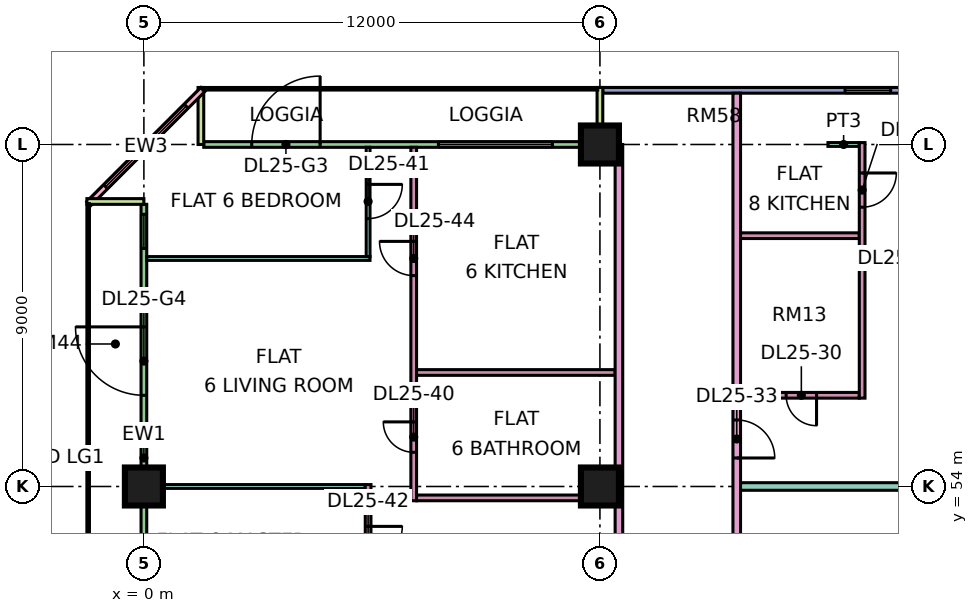
"""IFC4 building model, lengths in metres.
Left out: names, types, materials, properties, quantities, classifications, styles, units other than length and angle.
Written with IfcOpenShell. Run it as: python <this file> out.ifc"""

import sys

from ifc_helpers import new_model, si_unit, direction, frame, frame_2d, origin, origin_2d, place, context, subcontext, project, spatial, rectangle, extrude, element, fill, save


model = new_model("IFC4")
c1 = context("Model", 3, precision=1e-05, world=origin(), true_north=direction((0.0, 1.0)))
c2 = subcontext(c1, "Body", "Model", "MODEL_VIEW")
j1 = project(units=[si_unit("LENGTHUNIT", "METRE"), si_unit("PLANEANGLEUNIT", "RADIAN")], contexts=[c1])
p1 = place(None, origin())
s1 = spatial("IfcSite", under=j1, at=p1, CompositionType="ELEMENT")
p2 = place(p1, origin())
s2 = spatial("IfcBuilding", under=s1, at=p2, CompositionType="ELEMENT")
p3 = place(p2, frame((0.0, 0.0, 110.65)))
s3 = spatial("IfcBuildingStorey", under=s2, at=p3, CompositionType="ELEMENT", Elevation=110.65)
for number, where, z_axis, x_axis in (
    (1, (0.0, 54.0, 0.0), (0.0, 0.0, 1.0), (1.0, 0.0, 0.0)),
    (2, (12.0, 54.0, 0.0), (0.0, 0.0, 1.0), (1.0, 0.0, 0.0)),
    (3, (12.0, 63.0, 0.0), (0.0, 0.0, 1.0), (1.0, 0.0, 0.0)),
):
    element("IfcColumn", number, at=place(p3, frame(where, z_axis=z_axis, x_axis=x_axis)), inside=s3, PredefinedType="COLUMN", context=c2, shape_type="SweptSolid", body=[
        extrude(rectangle(XDim=1.0, YDim=1.0, at=origin_2d()), origin(), (0.0, 0.0, 1.0), 3.75),
    ])
p4 = place(p3, frame((22.5, 64.425, 0.0), z_axis=(0.0, 0.0, 1.0), x_axis=(-1.0, 0.0, 0.0)))
e4 = element("IfcWall", 4, at=p4, inside=s3, PredefinedType="SOLIDWALL", context=c2, shape_type="SweptSolid", body=[
    extrude(rectangle(XDim=10.425, YDim=0.15, at=frame_2d((5.212, 0.0))), origin(), (0.0, 0.0, 1.0), 3.35),
])
p5 = place(p4, frame((0.6, 0.0, 0.45)))
e5 = element("IfcOpeningElement", 5, at=p5, cuts=e4, PredefinedType="OPENING", context=c2, shape_type="SweptSolid", body=[
    extrude(rectangle(XDim=1.2, YDim=2.4, at=frame_2d((0.6, 1.2))), frame((0.0, 0.085, 0.0), z_axis=(0.0, -1.0, 0.0), x_axis=(1.0, 0.0, 0.0)), (0.0, 0.0, 1.0), 0.17),
])
p6 = place(p4, frame((2.85, 0.0, 0.45)))
e6 = element("IfcOpeningElement", 6, at=p6, cuts=e4, PredefinedType="OPENING", context=c2, shape_type="SweptSolid", body=[
    extrude(rectangle(XDim=1.2, YDim=2.4, at=frame_2d((0.6, 1.2))), frame((0.0, 0.085, 0.0), z_axis=(0.0, -1.0, 0.0), x_axis=(1.0, 0.0, 0.0)), (0.0, 0.0, 1.0), 0.17),
])
p7 = place(p3, frame((11.925, 63.0, 0.0), z_axis=(0.0, 0.0, 1.0), x_axis=(-1.0, 0.0, 0.0)))
e7 = element("IfcWall", 7, at=p7, inside=s3, PredefinedType="SOLIDWALL", context=c2, shape_type="SweptSolid", body=[
    extrude(rectangle(XDim=10.35, YDim=0.15, at=frame_2d((5.175, 0.0))), origin(), (0.0, 0.0, 1.0), 3.35),
])
p8 = place(p7, frame((1.175, 0.0, 0.45)))
e8 = element("IfcOpeningElement", 8, at=p8, cuts=e7, PredefinedType="OPENING", context=c2, shape_type="SweptSolid", body=[
    extrude(rectangle(XDim=3.0, YDim=2.4, at=frame_2d((1.5, 1.2))), frame((0.0, 0.085, 0.0), z_axis=(0.0, -1.0, 0.0), x_axis=(1.0, 0.0, 0.0)), (0.0, 0.0, 1.0), 0.17),
])
p9 = place(p7, frame((7.288, 0.0, 0.0)))
e9 = element("IfcOpeningElement", 9, at=p9, cuts=e7, PredefinedType="OPENING", context=c2, shape_type="SweptSolid", body=[
    extrude(rectangle(XDim=1.8, YDim=2.4, at=frame_2d((0.9, 1.2))), frame((0.0, 0.085, 0.0), z_axis=(0.0, -1.0, 0.0), x_axis=(1.0, 0.0, 0.0)), (0.0, 0.0, 1.0), 0.17),
])
for number, where, z_axis, x_axis in (
    (10, (12.0, 64.5, 0.0), (0.0, 0.0, 1.0), (0.0, -1.0, 0.0)),
    (11, (1.5, 64.5, 0.0), (0.0, 0.0, 1.0), (0.0, -1.0, 0.0)),
):
    element("IfcWall", number, at=place(p3, frame(where, z_axis=z_axis, x_axis=x_axis)), inside=s3, PredefinedType="SOLIDWALL", context=c2, shape_type="SweptSolid", body=[
        extrude(rectangle(XDim=1.5, YDim=0.15, at=frame_2d((0.75, 0.0))), origin(), (0.0, 0.0, 1.0), 3.35),
    ])
p10 = place(p3, frame((1.553, 64.447, 0.0), z_axis=(0.0, 0.0, 1.0), x_axis=(-0.707106781187, -0.707106781187, 0.0)))
e12 = element("IfcWall", 12, at=p10, inside=s3, PredefinedType="SOLIDWALL", context=c2, shape_type="SweptSolid", body=[
    extrude(rectangle(XDim=4.243, YDim=0.15, at=frame_2d((2.121, 0.0))), origin(), (0.0, 0.0, 1.0), 3.35),
])
p11 = place(p10, frame((0.621, 0.0, 0.45)))
e13 = element("IfcOpeningElement", 13, at=p11, cuts=e12, PredefinedType="OPENING", context=c2, shape_type="SweptSolid", body=[
    extrude(rectangle(XDim=3.0, YDim=2.4, at=frame_2d((1.5, 1.2))), frame((0.0, 0.085, 0.0), z_axis=(0.0, -1.0, 0.0), x_axis=(1.0, 0.0, 0.0)), (0.0, 0.0, 1.0), 0.17),
])
p12 = place(p3, frame((0.0, 61.425, 0.0), z_axis=(0.0, 0.0, 1.0), x_axis=(0.0, -1.0, 0.0)))
e14 = element("IfcWall", 14, at=p12, inside=s3, PredefinedType="SOLIDWALL", context=c2, shape_type="SweptSolid", body=[
    extrude(rectangle(XDim=13.35, YDim=0.15, at=frame_2d((6.675, 0.0))), origin(), (0.0, 0.0, 1.0), 3.35),
])
p13 = place(p12, frame((0.262, 0.0, 0.45)))
e15 = element("IfcOpeningElement", 15, at=p13, cuts=e14, PredefinedType="OPENING", context=c2, shape_type="SweptSolid", body=[
    extrude(rectangle(XDim=0.9, YDim=2.4, at=frame_2d((0.45, 1.2))), frame((0.0, 0.085, 0.0), z_axis=(0.0, -1.0, 0.0), x_axis=(1.0, 0.0, 0.0)), (0.0, 0.0, 1.0), 0.17),
])
p14 = place(p12, frame((3.225, 0.0, 0.0)))
e16 = element("IfcOpeningElement", 16, at=p14, cuts=e14, PredefinedType="OPENING", context=c2, shape_type="SweptSolid", body=[
    extrude(rectangle(XDim=1.8, YDim=2.4, at=frame_2d((0.9, 1.2))), frame((0.0, 0.085, 0.0), z_axis=(0.0, -1.0, 0.0), x_axis=(1.0, 0.0, 0.0)), (0.0, 0.0, 1.0), 0.17),
])
p15 = place(p12, frame((9.188, 0.0, 0.45)))
e17 = element("IfcOpeningElement", 17, at=p15, cuts=e14, PredefinedType="OPENING", context=c2, shape_type="SweptSolid", body=[
    extrude(rectangle(XDim=3.0, YDim=2.4, at=frame_2d((1.5, 1.2))), frame((0.0, 0.085, 0.0), z_axis=(0.0, -1.0, 0.0), x_axis=(1.0, 0.0, 0.0)), (0.0, 0.0, 1.0), 0.17),
])
p16 = place(p3, frame((-1.5, 61.5, 0.0), z_axis=(0.0, 0.0, 1.0), x_axis=(1.0, 0.0, 0.0)))
e18 = element("IfcWall", 18, at=p16, inside=s3, PredefinedType="SOLIDWALL", context=c2, shape_type="SweptSolid", body=[
    extrude(rectangle(XDim=1.5, YDim=0.15, at=frame_2d((0.75, 0.0))), origin(), (0.0, 0.0, 1.0), 3.35),
])
p17 = place(p3, frame((0.074, 54.0, 0.0), z_axis=(0.0, 0.0, 1.0), x_axis=(1.0, 0.0, 0.0)))
e19 = element("IfcWall", 19, at=p17, inside=s3, PredefinedType="PARTITIONING", context=c2, shape_type="SweptSolid", body=[
    extrude(rectangle(XDim=5.751, YDim=0.1, at=frame_2d((2.875, 0.0))), origin(), (0.0, 0.0, 1.0), 3.35),
])
p18 = place(p3, frame((0.074, 60.0, 0.0), z_axis=(0.0, 0.0, 1.0), x_axis=(1.0, 0.0, 0.0)))
e20 = element("IfcWall", 20, at=p18, inside=s3, PredefinedType="PARTITIONING", context=c2, shape_type="SweptSolid", body=[
    extrude(rectangle(XDim=5.876, YDim=0.1, at=frame_2d((2.938, 0.0))), origin(), (0.0, 0.0, 1.0), 3.35),
])
p19 = place(p3, frame((5.9, 48.1, 0.0), z_axis=(0.0, 0.0, 1.0), x_axis=(0.0, 1.0, 0.0)))
e21 = element("IfcWall", 21, at=p19, inside=s3, PredefinedType="PARTITIONING", context=c2, shape_type="SweptSolid", body=[
    extrude(rectangle(XDim=5.95, YDim=0.15, at=frame_2d((2.975, 0.0))), origin(), (0.0, 0.0, 1.0), 3.35),
])
p20 = place(p19, frame((3.95, 0.0, 0.0)))
e22 = element("IfcOpeningElement", 22, at=p20, cuts=e21, PredefinedType="OPENING", context=c2, shape_type="SweptSolid", body=[
    extrude(rectangle(XDim=0.9, YDim=2.1, at=frame_2d((0.45, 1.05))), frame((0.0, 0.085, 0.0), z_axis=(0.0, -1.0, 0.0), x_axis=(1.0, 0.0, 0.0)), (0.0, 0.0, 1.0), 0.17),
])
p21 = place(p3, frame((5.9, 60.05, 0.0), z_axis=(0.0, 0.0, 1.0), x_axis=(0.0, 1.0, 0.0)))
e23 = element("IfcWall", 23, at=p21, inside=s3, PredefinedType="PARTITIONING", context=c2, shape_type="SweptSolid", body=[
    extrude(rectangle(XDim=2.876, YDim=0.1, at=frame_2d((1.438, 0.0))), origin(), (0.0, 0.0, 1.0), 3.35),
])
p22 = place(p21, frame((1.0, 0.0, 0.0)))
e24 = element("IfcOpeningElement", 24, at=p22, cuts=e23, PredefinedType="OPENING", context=c2, shape_type="SweptSolid", body=[
    extrude(rectangle(XDim=0.9, YDim=2.1, at=frame_2d((0.45, 1.05))), frame((0.0, 0.06, 0.0), z_axis=(0.0, -1.0, 0.0), x_axis=(1.0, 0.0, 0.0)), (0.0, 0.0, 1.0), 0.12),
])
p23 = place(p3, frame((7.1, 53.625, 0.0), z_axis=(0.0, 0.0, 1.0), x_axis=(0.0, 1.0, 0.0)))
e25 = element("IfcWall", 25, at=p23, inside=s3, PredefinedType="PARTITIONING", context=c2, shape_type="SweptSolid", body=[
    extrude(rectangle(XDim=9.301, YDim=0.15, at=frame_2d((4.65, 0.0))), origin(), (0.0, 0.0, 1.0), 3.35),
])
p24 = place(p23, frame((1.275, 0.0, 0.0)))
e26 = element("IfcOpeningElement", 26, at=p24, cuts=e25, PredefinedType="OPENING", context=c2, shape_type="SweptSolid", body=[
    extrude(rectangle(XDim=0.8, YDim=2.1, at=frame_2d((0.4, 1.05))), frame((0.0, 0.085, 0.0), z_axis=(0.0, -1.0, 0.0), x_axis=(1.0, 0.0, 0.0)), (0.0, 0.0, 1.0), 0.17),
])
p25 = place(p23, frame((5.925, 0.0, 0.0)))
e27 = element("IfcOpeningElement", 27, at=p25, cuts=e25, PredefinedType="OPENING", context=c2, shape_type="SweptSolid", body=[
    extrude(rectangle(XDim=0.9, YDim=2.1, at=frame_2d((0.45, 1.05))), frame((0.0, 0.085, 0.0), z_axis=(0.0, -1.0, 0.0), x_axis=(1.0, 0.0, 0.0)), (0.0, 0.0, 1.0), 0.17),
])
for number, where, z_axis, x_axis in (
    (28, (7.175, 53.7, 0.0), (0.0, 0.0, 1.0), (1.0, 0.0, 0.0)),
    (29, (7.175, 57.0, 0.0), (0.0, 0.0, 1.0), (1.0, 0.0, 0.0)),
):
    element("IfcWall", number, at=place(p3, frame(where, z_axis=z_axis, x_axis=x_axis)), inside=s3, PredefinedType="PARTITIONING", context=c2, shape_type="SweptSolid", body=[
        extrude(rectangle(XDim=5.225, YDim=0.15, at=frame_2d((2.612, 0.0))), origin(), (0.0, 0.0, 1.0), 3.35),
    ])
p26 = place(p3, frame((12.5, 20.0, 0.0), z_axis=(0.0, 0.0, 1.0), x_axis=(0.0, 1.0, 0.0)))
e30 = element("IfcWall", 30, at=p26, inside=s3, PredefinedType="PARTITIONING", context=c2, shape_type="SweptSolid", body=[
    extrude(rectangle(XDim=43.0, YDim=0.2, at=frame_2d((21.5, 0.0))), origin(), (0.0, 0.0, 1.0), 3.35),
])
p27 = place(p26, frame((25.95, 0.0, 0.0)))
e31 = element("IfcOpeningElement", 31, at=p27, cuts=e30, PredefinedType="OPENING", context=c2, shape_type="SweptSolid", body=[
    extrude(rectangle(XDim=1.0, YDim=2.1, at=frame_2d((0.5, 1.05))), frame((0.0, 0.11, 0.0), z_axis=(0.0, -1.0, 0.0), x_axis=(1.0, 0.0, 0.0)), (0.0, 0.0, 1.0), 0.22),
])
p28 = place(p26, frame((29.25, 0.0, 0.0)))
e32 = element("IfcOpeningElement", 32, at=p28, cuts=e30, PredefinedType="OPENING", context=c2, shape_type="SweptSolid", body=[
    extrude(rectangle(XDim=1.0, YDim=2.1, at=frame_2d((0.5, 1.05))), frame((0.0, 0.11, 0.0), z_axis=(0.0, -1.0, 0.0), x_axis=(1.0, 0.0, 0.0)), (0.0, 0.0, 1.0), 0.22),
])
p29 = place(p26, frame((0.6, 0.0, 0.0)))
e33 = element("IfcOpeningElement", 33, at=p29, cuts=e30, PredefinedType="OPENING", context=c2, shape_type="SweptSolid", body=[
    extrude(rectangle(XDim=1.2, YDim=2.1, at=frame_2d((0.6, 1.05))), frame((0.0, 0.11, 0.0), z_axis=(0.0, -1.0, 0.0), x_axis=(1.0, 0.0, 0.0)), (0.0, 0.0, 1.0), 0.22),
])
p30 = place(p26, frame((4.65, 0.0, 0.0)))
e34 = element("IfcOpeningElement", 34, at=p30, cuts=e30, PredefinedType="OPENING", context=c2, shape_type="SweptSolid", body=[
    extrude(rectangle(XDim=1.0, YDim=2.1, at=frame_2d((0.5, 1.05))), frame((0.0, 0.11, 0.0), z_axis=(0.0, -1.0, 0.0), x_axis=(1.0, 0.0, 0.0)), (0.0, 0.0, 1.0), 0.22),
])
p31 = place(p3, frame((15.6, 51.225, 0.0), z_axis=(0.0, 0.0, 1.0), x_axis=(0.0, 1.0, 0.0)))
e35 = element("IfcWall", 35, at=p31, inside=s3, PredefinedType="PARTITIONING", context=c2, shape_type="SweptSolid", body=[
    extrude(rectangle(XDim=13.125, YDim=0.2, at=frame_2d((6.562, 0.0))), origin(), (0.0, 0.0, 1.0), 3.35),
])
p32 = place(p31, frame((3.525, 0.0, 0.0)))
e36 = element("IfcOpeningElement", 36, at=p32, cuts=e35, PredefinedType="OPENING", context=c2, shape_type="SweptSolid", body=[
    extrude(rectangle(XDim=1.0, YDim=2.1, at=frame_2d((0.5, 1.05))), frame((0.0, 0.11, 0.0), z_axis=(0.0, -1.0, 0.0), x_axis=(1.0, 0.0, 0.0)), (0.0, 0.0, 1.0), 0.22),
])
p33 = place(p3, frame((15.7, 54.0, 0.0), z_axis=(0.0, 0.0, 1.0), x_axis=(1.0, 0.0, 0.0)))
e37 = element("IfcWall", 37, at=p33, inside=s3, PredefinedType="PARTITIONING", context=c2, shape_type="SweptSolid", body=[
    extrude(rectangle(XDim=8.226, YDim=0.2, at=frame_2d((4.113, 0.0))), origin(), (0.0, 0.0, 1.0), 3.35),
])
p34 = place(p3, frame((15.7, 56.4, 0.0), z_axis=(0.0, 0.0, 1.0), x_axis=(1.0, 0.0, 0.0)))
e38 = element("IfcWall", 38, at=p34, inside=s3, PredefinedType="PARTITIONING", context=c2, shape_type="SweptSolid", body=[
    extrude(rectangle(XDim=3.125, YDim=0.15, at=frame_2d((1.562, 0.0))), origin(), (0.0, 0.0, 1.0), 3.35),
])
p35 = place(p34, frame((1.2, 0.0, 0.0)))
e39 = element("IfcOpeningElement", 39, at=p35, cuts=e38, PredefinedType="OPENING", context=c2, shape_type="SweptSolid", body=[
    extrude(rectangle(XDim=0.8, YDim=2.1, at=frame_2d((0.4, 1.05))), frame((0.0, 0.085, 0.0), z_axis=(0.0, -1.0, 0.0), x_axis=(1.0, 0.0, 0.0)), (0.0, 0.0, 1.0), 0.17),
])
p36 = place(p3, frame((15.7, 60.6, 0.0), z_axis=(0.0, 0.0, 1.0), x_axis=(1.0, 0.0, 0.0)))
e40 = element("IfcWall", 40, at=p36, inside=s3, PredefinedType="PARTITIONING", context=c2, shape_type="SweptSolid", body=[
    extrude(rectangle(XDim=3.125, YDim=0.15, at=frame_2d((1.562, 0.0))), origin(), (0.0, 0.0, 1.0), 3.35),
])
p37 = place(p3, frame((18.0, 63.0, 0.0), z_axis=(0.0, 0.0, 1.0), x_axis=(1.0, 0.0, 0.0)))
e41 = element("IfcWall", 41, at=p37, inside=s3, PredefinedType="PARTITIONING", context=c2, shape_type="SweptSolid", body=[
    extrude(rectangle(XDim=0.825, YDim=0.1, at=frame_2d((0.413, 0.0))), origin(), (0.0, 0.0, 1.0), 3.35),
])
p38 = place(p3, frame((18.9, 56.325, 0.0), z_axis=(0.0, 0.0, 1.0), x_axis=(0.0, 1.0, 0.0)))
e42 = element("IfcWall", 42, at=p38, inside=s3, PredefinedType="PARTITIONING", context=c2, shape_type="SweptSolid", body=[
    extrude(rectangle(XDim=6.725, YDim=0.15, at=frame_2d((3.363, 0.0))), origin(), (0.0, 0.0, 1.0), 3.35),
])
p39 = place(p38, frame((5.025, 0.0, 0.0)))
e43 = element("IfcOpeningElement", 43, at=p39, cuts=e42, PredefinedType="OPENING", context=c2, shape_type="SweptSolid", body=[
    extrude(rectangle(XDim=0.9, YDim=2.1, at=frame_2d((0.45, 1.05))), frame((0.0, 0.085, 0.0), z_axis=(0.0, -1.0, 0.0), x_axis=(1.0, 0.0, 0.0)), (0.0, 0.0, 1.0), 0.17),
])
p40 = place(p6, origin())
e44 = element("IfcWindow", 44, at=p40, inside=s3, PartitioningType="SINGLE_PANEL", PredefinedType="WINDOW", context=c2, shape_type="SweptSolid", body=[
    extrude(rectangle(XDim=1.2, YDim=2.4, at=frame_2d((0.6, 1.2))), frame((0.0, 0.03, 0.0), z_axis=(0.0, -1.0, 0.0), x_axis=(1.0, 0.0, 0.0)), (0.0, 0.0, 1.0), 0.06),
])
fill(e6, e44)
p41 = place(p8, origin())
e45 = element("IfcWindow", 45, at=p41, inside=s3, PartitioningType="SINGLE_PANEL", PredefinedType="WINDOW", context=c2, shape_type="SweptSolid", body=[
    extrude(rectangle(XDim=3.0, YDim=2.4, at=frame_2d((1.5, 1.2))), frame((0.0, 0.03, 0.0), z_axis=(0.0, -1.0, 0.0), x_axis=(1.0, 0.0, 0.0)), (0.0, 0.0, 1.0), 0.06),
])
fill(e8, e45)
p42 = place(p9, frame((1.8, 0.0, 0.0), z_axis=(0.0, 0.0, 1.0), x_axis=(-1.0, 0.0, 0.0)))
e46 = element("IfcDoor", 46, at=p42, inside=s3, OperationType="DOUBLE_DOOR_SINGLE_SWING", PredefinedType="DOOR", context=c2, shape_type="SweptSolid", body=[
    extrude(rectangle(XDim=1.8, YDim=2.4, at=frame_2d((0.9, 1.2))), frame((0.0, 0.025, 0.0), z_axis=(0.0, -1.0, 0.0), x_axis=(1.0, 0.0, 0.0)), (0.0, 0.0, 1.0), 0.05),
])
fill(e9, e46)
p43 = place(p11, origin())
e47 = element("IfcWindow", 47, at=p43, inside=s3, PartitioningType="SINGLE_PANEL", PredefinedType="WINDOW", context=c2, shape_type="SweptSolid", body=[
    extrude(rectangle(XDim=3.0, YDim=2.4, at=frame_2d((1.5, 1.2))), frame((0.0, 0.03, 0.0), z_axis=(0.0, -1.0, 0.0), x_axis=(1.0, 0.0, 0.0)), (0.0, 0.0, 1.0), 0.06),
])
fill(e13, e47)
p44 = place(p13, origin())
e48 = element("IfcWindow", 48, at=p44, inside=s3, PartitioningType="SINGLE_PANEL", PredefinedType="WINDOW", context=c2, shape_type="SweptSolid", body=[
    extrude(rectangle(XDim=0.9, YDim=2.4, at=frame_2d((0.45, 1.2))), frame((0.0, 0.03, 0.0), z_axis=(0.0, -1.0, 0.0), x_axis=(1.0, 0.0, 0.0)), (0.0, 0.0, 1.0), 0.06),
])
fill(e15, e48)
p45 = place(p14, frame((1.8, 0.0, 0.0), z_axis=(0.0, 0.0, 1.0), x_axis=(-1.0, 0.0, 0.0)))
e49 = element("IfcDoor", 49, at=p45, inside=s3, OperationType="DOUBLE_DOOR_SINGLE_SWING", PredefinedType="DOOR", context=c2, shape_type="SweptSolid", body=[
    extrude(rectangle(XDim=1.8, YDim=2.4, at=frame_2d((0.9, 1.2))), frame((0.0, 0.025, 0.0), z_axis=(0.0, -1.0, 0.0), x_axis=(1.0, 0.0, 0.0)), (0.0, 0.0, 1.0), 0.05),
])
fill(e16, e49)
p46 = place(p35, origin())
e50 = element("IfcDoor", 50, at=p46, inside=s3, OperationType="SINGLE_SWING_RIGHT", PredefinedType="DOOR", context=c2, shape_type="SweptSolid", body=[
    extrude(rectangle(XDim=0.8, YDim=2.1, at=frame_2d((0.4, 1.05))), frame((0.0, 0.025, 0.0), z_axis=(0.0, -1.0, 0.0), x_axis=(1.0, 0.0, 0.0)), (0.0, 0.0, 1.0), 0.05),
])
fill(e39, e50)
p47 = place(p39, origin())
e51 = element("IfcDoor", 51, at=p47, inside=s3, OperationType="SINGLE_SWING_RIGHT", PredefinedType="DOOR", context=c2, shape_type="SweptSolid", body=[
    extrude(rectangle(XDim=0.9, YDim=2.1, at=frame_2d((0.45, 1.05))), frame((0.0, 0.025, 0.0), z_axis=(0.0, -1.0, 0.0), x_axis=(1.0, 0.0, 0.0)), (0.0, 0.0, 1.0), 0.05),
])
fill(e43, e51)
p48 = place(p32, frame((1.0, 0.0, 0.0), z_axis=(0.0, 0.0, 1.0), x_axis=(-1.0, 0.0, 0.0)))
e52 = element("IfcDoor", 52, at=p48, inside=s3, OperationType="SINGLE_SWING_LEFT", PredefinedType="DOOR", context=c2, shape_type="SweptSolid", body=[
    extrude(rectangle(XDim=1.0, YDim=2.1, at=frame_2d((0.5, 1.05))), frame((0.0, 0.025, 0.0), z_axis=(0.0, -1.0, 0.0), x_axis=(1.0, 0.0, 0.0)), (0.0, 0.0, 1.0), 0.05),
])
fill(e36, e52)
p49 = place(p24, frame((0.8, 0.0, 0.0), z_axis=(0.0, 0.0, 1.0), x_axis=(-1.0, 0.0, 0.0)))
e53 = element("IfcDoor", 53, at=p49, inside=s3, OperationType="SINGLE_SWING_RIGHT", PredefinedType="DOOR", context=c2, shape_type="SweptSolid", body=[
    extrude(rectangle(XDim=0.8, YDim=2.1, at=frame_2d((0.4, 1.05))), frame((0.0, 0.025, 0.0), z_axis=(0.0, -1.0, 0.0), x_axis=(1.0, 0.0, 0.0)), (0.0, 0.0, 1.0), 0.05),
])
fill(e26, e53)
p50 = place(p22, origin())
e54 = element("IfcDoor", 54, at=p50, inside=s3, OperationType="SINGLE_SWING_RIGHT", PredefinedType="DOOR", context=c2, shape_type="SweptSolid", body=[
    extrude(rectangle(XDim=0.9, YDim=2.1, at=frame_2d((0.45, 1.05))), frame((0.0, 0.025, 0.0), z_axis=(0.0, -1.0, 0.0), x_axis=(1.0, 0.0, 0.0)), (0.0, 0.0, 1.0), 0.05),
])
fill(e24, e54)
p51 = place(p20, origin())
e55 = element("IfcDoor", 55, at=p51, inside=s3, OperationType="SINGLE_SWING_RIGHT", PredefinedType="DOOR", context=c2, shape_type="SweptSolid", body=[
    extrude(rectangle(XDim=0.9, YDim=2.1, at=frame_2d((0.45, 1.05))), frame((0.0, 0.025, 0.0), z_axis=(0.0, -1.0, 0.0), x_axis=(1.0, 0.0, 0.0)), (0.0, 0.0, 1.0), 0.05),
])
fill(e22, e55)
p52 = place(p25, frame((0.9, 0.0, 0.0), z_axis=(0.0, 0.0, 1.0), x_axis=(-1.0, 0.0, 0.0)))
e56 = element("IfcDoor", 56, at=p52, inside=s3, OperationType="SINGLE_SWING_RIGHT", PredefinedType="DOOR", context=c2, shape_type="SweptSolid", body=[
    extrude(rectangle(XDim=0.9, YDim=2.1, at=frame_2d((0.45, 1.05))), frame((0.0, 0.025, 0.0), z_axis=(0.0, -1.0, 0.0), x_axis=(1.0, 0.0, 0.0)), (0.0, 0.0, 1.0), 0.05),
])
fill(e27, e56)
save(model, sys.argv[1])
